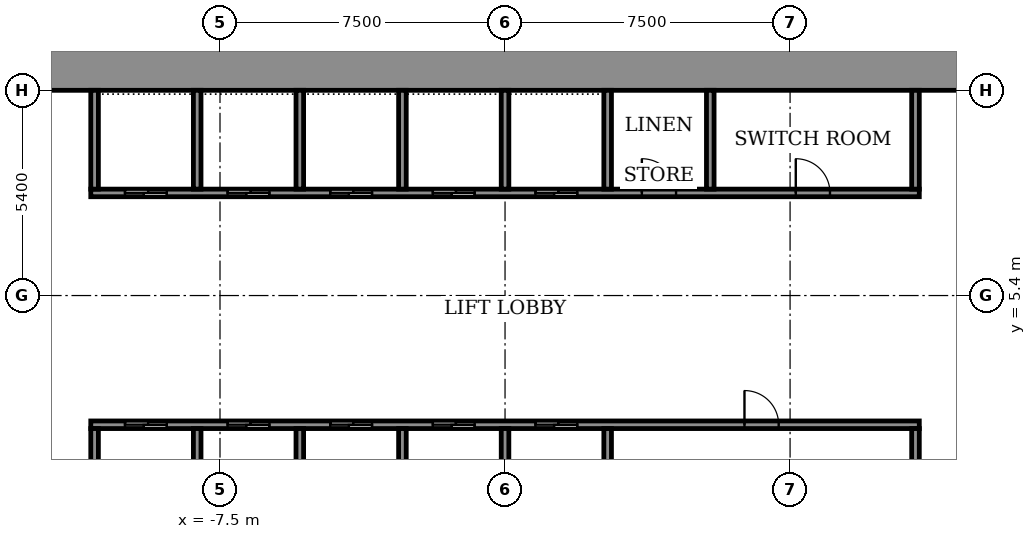
"""IFC4 building model, lengths in metres.
Left out: names, types, materials, properties, quantities, classifications, styles, units other than length and angle.
Written with IfcOpenShell. Run it as: python <this file> out.ifc"""

import sys

from ifc_helpers import new_model, si_unit, direction, frame, frame_2d, origin, place, context, subcontext, project, spatial, rectangle, extrude, element, fill, save


model = new_model("IFC4")
c1 = context("Model", 3, precision=1e-05, world=origin(), true_north=direction((0.0, 1.0)))
c2 = subcontext(c1, "Body", "Model", "MODEL_VIEW")
j1 = project(units=[si_unit("LENGTHUNIT", "METRE"), si_unit("PLANEANGLEUNIT", "RADIAN")], contexts=[c1])
p1 = place(None, origin())
s1 = spatial("IfcSite", under=j1, at=p1, CompositionType="ELEMENT")
p2 = place(p1, origin())
s2 = spatial("IfcBuilding", under=s1, at=p2, CompositionType="ELEMENT")
p3 = place(p2, frame((0.0, 0.0, 44.9)))
s3 = spatial("IfcBuildingStorey", under=s2, at=p3, CompositionType="ELEMENT", Elevation=44.9)
p4 = place(p3, frame((-14.9, 11.35, 0.0), z_axis=(0.0, 0.0, 1.0), x_axis=(1.0, 0.0, 0.0)))
e1 = element("IfcWall", 1, at=p4, inside=s3, PredefinedType="SHEAR", context=c2, shape_type="SweptSolid", body=[
    extrude(rectangle(XDim=29.8, YDim=1.1, at=frame_2d((14.9, 0.0))), origin(), (0.0, 0.0, 1.0), 3.6),
])
p5 = place(p3, frame((-10.9, 2.0, 0.0), z_axis=(0.0, 0.0, 1.0), x_axis=(1.0, 0.0, 0.0)))
e2 = element("IfcWall", 2, at=p5, inside=s3, PredefinedType="SHEAR", context=c2, shape_type="SweptSolid", body=[
    extrude(rectangle(XDim=21.8, YDim=0.2, at=frame_2d((10.9, 0.0))), origin(), (0.0, 0.0, 1.0), 3.05),
])
p6 = place(p5, frame((0.9, 0.0, 0.0)))
e3 = element("IfcOpeningElement", 3, at=p6, cuts=e2, PredefinedType="OPENING", context=c2, shape_type="SweptSolid", body=[
    extrude(rectangle(XDim=1.1, YDim=2.1, at=frame_2d((0.55, 1.05))), frame((0.0, 0.11, 0.0), z_axis=(0.0, -1.0, 0.0), x_axis=(1.0, 0.0, 0.0)), (0.0, 0.0, 1.0), 0.22),
])
p7 = place(p5, frame((3.6, 0.0, 0.0)))
e4 = element("IfcOpeningElement", 4, at=p7, cuts=e2, PredefinedType="OPENING", context=c2, shape_type="SweptSolid", body=[
    extrude(rectangle(XDim=1.1, YDim=2.1, at=frame_2d((0.55, 1.05))), frame((0.0, 0.11, 0.0), z_axis=(0.0, -1.0, 0.0), x_axis=(1.0, 0.0, 0.0)), (0.0, 0.0, 1.0), 0.22),
])
p8 = place(p5, frame((6.3, 0.0, 0.0)))
e5 = element("IfcOpeningElement", 5, at=p8, cuts=e2, PredefinedType="OPENING", context=c2, shape_type="SweptSolid", body=[
    extrude(rectangle(XDim=1.1, YDim=2.1, at=frame_2d((0.55, 1.05))), frame((0.0, 0.11, 0.0), z_axis=(0.0, -1.0, 0.0), x_axis=(1.0, 0.0, 0.0)), (0.0, 0.0, 1.0), 0.22),
])
p9 = place(p5, frame((9.0, 0.0, 0.0)))
e6 = element("IfcOpeningElement", 6, at=p9, cuts=e2, PredefinedType="OPENING", context=c2, shape_type="SweptSolid", body=[
    extrude(rectangle(XDim=1.1, YDim=2.1, at=frame_2d((0.55, 1.05))), frame((0.0, 0.11, 0.0), z_axis=(0.0, -1.0, 0.0), x_axis=(1.0, 0.0, 0.0)), (0.0, 0.0, 1.0), 0.22),
])
p10 = place(p5, frame((11.7, 0.0, 0.0)))
e7 = element("IfcOpeningElement", 7, at=p10, cuts=e2, PredefinedType="OPENING", context=c2, shape_type="SweptSolid", body=[
    extrude(rectangle(XDim=1.1, YDim=2.1, at=frame_2d((0.55, 1.05))), frame((0.0, 0.11, 0.0), z_axis=(0.0, -1.0, 0.0), x_axis=(1.0, 0.0, 0.0)), (0.0, 0.0, 1.0), 0.22),
])
p11 = place(p5, frame((17.2, 0.0, 0.0)))
e8 = element("IfcOpeningElement", 8, at=p11, cuts=e2, PredefinedType="OPENING", context=c2, shape_type="SweptSolid", body=[
    extrude(rectangle(XDim=0.9, YDim=2.1, at=frame_2d((0.45, 1.05))), frame((0.0, 0.11, 0.0), z_axis=(0.0, -1.0, 0.0), x_axis=(1.0, 0.0, 0.0)), (0.0, 0.0, 1.0), 0.22),
])
p12 = place(p3, frame((-10.9, 8.1, 0.0), z_axis=(0.0, 0.0, 1.0), x_axis=(1.0, 0.0, 0.0)))
e9 = element("IfcWall", 9, at=p12, inside=s3, PredefinedType="SHEAR", context=c2, shape_type="SweptSolid", body=[
    extrude(rectangle(XDim=21.8, YDim=0.2, at=frame_2d((10.9, 0.0))), origin(), (0.0, 0.0, 1.0), 3.05),
])
p13 = place(p12, frame((0.9, 0.0, 0.0)))
e10 = element("IfcOpeningElement", 10, at=p13, cuts=e9, PredefinedType="OPENING", context=c2, shape_type="SweptSolid", body=[
    extrude(rectangle(XDim=1.1, YDim=2.1, at=frame_2d((0.55, 1.05))), frame((0.0, 0.11, 0.0), z_axis=(0.0, -1.0, 0.0), x_axis=(1.0, 0.0, 0.0)), (0.0, 0.0, 1.0), 0.22),
])
p14 = place(p12, frame((3.6, 0.0, 0.0)))
e11 = element("IfcOpeningElement", 11, at=p14, cuts=e9, PredefinedType="OPENING", context=c2, shape_type="SweptSolid", body=[
    extrude(rectangle(XDim=1.1, YDim=2.1, at=frame_2d((0.55, 1.05))), frame((0.0, 0.11, 0.0), z_axis=(0.0, -1.0, 0.0), x_axis=(1.0, 0.0, 0.0)), (0.0, 0.0, 1.0), 0.22),
])
p15 = place(p12, frame((6.3, 0.0, 0.0)))
e12 = element("IfcOpeningElement", 12, at=p15, cuts=e9, PredefinedType="OPENING", context=c2, shape_type="SweptSolid", body=[
    extrude(rectangle(XDim=1.1, YDim=2.1, at=frame_2d((0.55, 1.05))), frame((0.0, 0.11, 0.0), z_axis=(0.0, -1.0, 0.0), x_axis=(1.0, 0.0, 0.0)), (0.0, 0.0, 1.0), 0.22),
])
p16 = place(p12, frame((9.0, 0.0, 0.0)))
e13 = element("IfcOpeningElement", 13, at=p16, cuts=e9, PredefinedType="OPENING", context=c2, shape_type="SweptSolid", body=[
    extrude(rectangle(XDim=1.1, YDim=2.1, at=frame_2d((0.55, 1.05))), frame((0.0, 0.11, 0.0), z_axis=(0.0, -1.0, 0.0), x_axis=(1.0, 0.0, 0.0)), (0.0, 0.0, 1.0), 0.22),
])
p17 = place(p12, frame((11.7, 0.0, 0.0)))
e14 = element("IfcOpeningElement", 14, at=p17, cuts=e9, PredefinedType="OPENING", context=c2, shape_type="SweptSolid", body=[
    extrude(rectangle(XDim=1.1, YDim=2.1, at=frame_2d((0.55, 1.05))), frame((0.0, 0.11, 0.0), z_axis=(0.0, -1.0, 0.0), x_axis=(1.0, 0.0, 0.0)), (0.0, 0.0, 1.0), 0.22),
])
p18 = place(p12, frame((14.5, 0.0, 0.0)))
e15 = element("IfcOpeningElement", 15, at=p18, cuts=e9, PredefinedType="OPENING", context=c2, shape_type="SweptSolid", body=[
    extrude(rectangle(XDim=0.9, YDim=2.1, at=frame_2d((0.45, 1.05))), frame((0.0, 0.11, 0.0), z_axis=(0.0, -1.0, 0.0), x_axis=(1.0, 0.0, 0.0)), (0.0, 0.0, 1.0), 0.22),
])
p19 = place(p12, frame((18.55, 0.0, 0.0)))
e16 = element("IfcOpeningElement", 16, at=p19, cuts=e9, PredefinedType="OPENING", context=c2, shape_type="SweptSolid", body=[
    extrude(rectangle(XDim=0.9, YDim=2.1, at=frame_2d((0.45, 1.05))), frame((0.0, 0.11, 0.0), z_axis=(0.0, -1.0, 0.0), x_axis=(1.0, 0.0, 0.0)), (0.0, 0.0, 1.0), 0.22),
])
for number, where, z_axis, x_axis in (
    (17, (-10.8, -0.6, 0.0), (0.0, 0.0, 1.0), (0.0, 1.0, 0.0)),
    (18, (-8.1, -0.6, 0.0), (0.0, 0.0, 1.0), (0.0, 1.0, 0.0)),
    (19, (-5.4, -0.6, 0.0), (0.0, 0.0, 1.0), (0.0, 1.0, 0.0)),
    (20, (-2.7, -0.6, 0.0), (0.0, 0.0, 1.0), (0.0, 1.0, 0.0)),
    (21, (0.0, -0.6, 0.0), (0.0, 0.0, 1.0), (0.0, 1.0, 0.0)),
    (22, (2.7, -0.6, 0.0), (0.0, 0.0, 1.0), (0.0, 1.0, 0.0)),
):
    element("IfcWall", number, at=place(p3, frame(where, z_axis=z_axis, x_axis=x_axis)), inside=s3, PredefinedType="SHEAR", context=c2, shape_type="SweptSolid", body=[
        extrude(rectangle(XDim=2.5, YDim=0.2, at=frame_2d((1.25, 0.0))), origin(), (0.0, 0.0, 1.0), 3.05),
    ])
p20 = place(p3, frame((10.8, -0.6, 0.0), z_axis=(0.0, 0.0, 1.0), x_axis=(0.0, 1.0, 0.0)))
e23 = element("IfcWall", 23, at=p20, inside=s3, PredefinedType="STANDARD", context=c2, shape_type="SweptSolid", body=[
    extrude(rectangle(XDim=2.5, YDim=0.2, at=frame_2d((1.25, 0.0))), origin(), (0.0, 0.0, 1.0), 3.05),
])
for number, where, z_axis, x_axis in (
    (24, (-10.8, 8.2, 0.0), (0.0, 0.0, 1.0), (0.0, 1.0, 0.0)),
    (25, (-8.1, 8.2, 0.0), (0.0, 0.0, 1.0), (0.0, 1.0, 0.0)),
    (26, (-5.4, 8.2, 0.0), (0.0, 0.0, 1.0), (0.0, 1.0, 0.0)),
    (27, (-2.7, 8.2, 0.0), (0.0, 0.0, 1.0), (0.0, 1.0, 0.0)),
    (28, (0.0, 8.2, 0.0), (0.0, 0.0, 1.0), (0.0, 1.0, 0.0)),
    (29, (2.7, 8.2, 0.0), (0.0, 0.0, 1.0), (0.0, 1.0, 0.0)),
):
    element("IfcWall", number, at=place(p3, frame(where, z_axis=z_axis, x_axis=x_axis)), inside=s3, PredefinedType="SHEAR", context=c2, shape_type="SweptSolid", body=[
        extrude(rectangle(XDim=2.6, YDim=0.2, at=frame_2d((1.3, 0.0))), origin(), (0.0, 0.0, 1.0), 3.05),
    ])
for number, where, z_axis, x_axis in (
    (30, (5.4, 8.2, 0.0), (0.0, 0.0, 1.0), (0.0, 1.0, 0.0)),
    (31, (10.8, 8.2, 0.0), (0.0, 0.0, 1.0), (0.0, 1.0, 0.0)),
):
    element("IfcWall", number, at=place(p3, frame(where, z_axis=z_axis, x_axis=x_axis)), inside=s3, PredefinedType="STANDARD", context=c2, shape_type="SweptSolid", body=[
        extrude(rectangle(XDim=2.6, YDim=0.2, at=frame_2d((1.3, 0.0))), origin(), (0.0, 0.0, 1.0), 3.05),
    ])
p21 = place(p6, origin())
e32 = element("IfcDoor", 32, at=p21, inside=s3, OperationType="SLIDING_TO_LEFT", PredefinedType="DOOR", context=c2, shape_type="SweptSolid", body=[
    extrude(rectangle(XDim=1.1, YDim=2.1, at=frame_2d((0.55, 1.05))), frame((0.0, 0.025, 0.0), z_axis=(0.0, -1.0, 0.0), x_axis=(1.0, 0.0, 0.0)), (0.0, 0.0, 1.0), 0.05),
])
fill(e3, e32)
p22 = place(p7, origin())
e33 = element("IfcDoor", 33, at=p22, inside=s3, OperationType="SLIDING_TO_LEFT", PredefinedType="DOOR", context=c2, shape_type="SweptSolid", body=[
    extrude(rectangle(XDim=1.1, YDim=2.1, at=frame_2d((0.55, 1.05))), frame((0.0, 0.025, 0.0), z_axis=(0.0, -1.0, 0.0), x_axis=(1.0, 0.0, 0.0)), (0.0, 0.0, 1.0), 0.05),
])
fill(e4, e33)
p23 = place(p8, origin())
e34 = element("IfcDoor", 34, at=p23, inside=s3, OperationType="SLIDING_TO_LEFT", PredefinedType="DOOR", context=c2, shape_type="SweptSolid", body=[
    extrude(rectangle(XDim=1.1, YDim=2.1, at=frame_2d((0.55, 1.05))), frame((0.0, 0.025, 0.0), z_axis=(0.0, -1.0, 0.0), x_axis=(1.0, 0.0, 0.0)), (0.0, 0.0, 1.0), 0.05),
])
fill(e5, e34)
p24 = place(p9, origin())
e35 = element("IfcDoor", 35, at=p24, inside=s3, OperationType="SLIDING_TO_LEFT", PredefinedType="DOOR", context=c2, shape_type="SweptSolid", body=[
    extrude(rectangle(XDim=1.1, YDim=2.1, at=frame_2d((0.55, 1.05))), frame((0.0, 0.025, 0.0), z_axis=(0.0, -1.0, 0.0), x_axis=(1.0, 0.0, 0.0)), (0.0, 0.0, 1.0), 0.05),
])
fill(e6, e35)
p25 = place(p10, origin())
e36 = element("IfcDoor", 36, at=p25, inside=s3, OperationType="SLIDING_TO_LEFT", PredefinedType="DOOR", context=c2, shape_type="SweptSolid", body=[
    extrude(rectangle(XDim=1.1, YDim=2.1, at=frame_2d((0.55, 1.05))), frame((0.0, 0.025, 0.0), z_axis=(0.0, -1.0, 0.0), x_axis=(1.0, 0.0, 0.0)), (0.0, 0.0, 1.0), 0.05),
])
fill(e7, e36)
p26 = place(p13, origin())
e37 = element("IfcDoor", 37, at=p26, inside=s3, OperationType="SLIDING_TO_LEFT", PredefinedType="DOOR", context=c2, shape_type="SweptSolid", body=[
    extrude(rectangle(XDim=1.1, YDim=2.1, at=frame_2d((0.55, 1.05))), frame((0.0, 0.025, 0.0), z_axis=(0.0, -1.0, 0.0), x_axis=(1.0, 0.0, 0.0)), (0.0, 0.0, 1.0), 0.05),
])
fill(e10, e37)
p27 = place(p14, origin())
e38 = element("IfcDoor", 38, at=p27, inside=s3, OperationType="SLIDING_TO_LEFT", PredefinedType="DOOR", context=c2, shape_type="SweptSolid", body=[
    extrude(rectangle(XDim=1.1, YDim=2.1, at=frame_2d((0.55, 1.05))), frame((0.0, 0.025, 0.0), z_axis=(0.0, -1.0, 0.0), x_axis=(1.0, 0.0, 0.0)), (0.0, 0.0, 1.0), 0.05),
])
fill(e11, e38)
p28 = place(p15, origin())
e39 = element("IfcDoor", 39, at=p28, inside=s3, OperationType="SLIDING_TO_LEFT", PredefinedType="DOOR", context=c2, shape_type="SweptSolid", body=[
    extrude(rectangle(XDim=1.1, YDim=2.1, at=frame_2d((0.55, 1.05))), frame((0.0, 0.025, 0.0), z_axis=(0.0, -1.0, 0.0), x_axis=(1.0, 0.0, 0.0)), (0.0, 0.0, 1.0), 0.05),
])
fill(e12, e39)
p29 = place(p16, origin())
e40 = element("IfcDoor", 40, at=p29, inside=s3, OperationType="SLIDING_TO_LEFT", PredefinedType="DOOR", context=c2, shape_type="SweptSolid", body=[
    extrude(rectangle(XDim=1.1, YDim=2.1, at=frame_2d((0.55, 1.05))), frame((0.0, 0.025, 0.0), z_axis=(0.0, -1.0, 0.0), x_axis=(1.0, 0.0, 0.0)), (0.0, 0.0, 1.0), 0.05),
])
fill(e13, e40)
p30 = place(p17, origin())
e41 = element("IfcDoor", 41, at=p30, inside=s3, OperationType="SLIDING_TO_LEFT", PredefinedType="DOOR", context=c2, shape_type="SweptSolid", body=[
    extrude(rectangle(XDim=1.1, YDim=2.1, at=frame_2d((0.55, 1.05))), frame((0.0, 0.025, 0.0), z_axis=(0.0, -1.0, 0.0), x_axis=(1.0, 0.0, 0.0)), (0.0, 0.0, 1.0), 0.05),
])
fill(e14, e41)
p31 = place(p11, origin())
e42 = element("IfcDoor", 42, at=p31, inside=s3, OperationType="SINGLE_SWING_LEFT", PredefinedType="DOOR", context=c2, shape_type="SweptSolid", body=[
    extrude(rectangle(XDim=0.9, YDim=2.1, at=frame_2d((0.45, 1.05))), frame((0.0, 0.025, 0.0), z_axis=(0.0, -1.0, 0.0), x_axis=(1.0, 0.0, 0.0)), (0.0, 0.0, 1.0), 0.05),
])
fill(e8, e42)
p32 = place(p18, origin())
e43 = element("IfcDoor", 43, at=p32, inside=s3, OperationType="SINGLE_SWING_RIGHT", PredefinedType="DOOR", context=c2, shape_type="SweptSolid", body=[
    extrude(rectangle(XDim=0.9, YDim=2.1, at=frame_2d((0.45, 1.05))), frame((0.0, 0.025, 0.0), z_axis=(0.0, -1.0, 0.0), x_axis=(1.0, 0.0, 0.0)), (0.0, 0.0, 1.0), 0.05),
])
fill(e15, e43)
p33 = place(p19, origin())
e44 = element("IfcDoor", 44, at=p33, inside=s3, OperationType="SINGLE_SWING_LEFT", PredefinedType="DOOR", context=c2, shape_type="SweptSolid", body=[
    extrude(rectangle(XDim=0.9, YDim=2.1, at=frame_2d((0.45, 1.05))), frame((0.0, 0.025, 0.0), z_axis=(0.0, -1.0, 0.0), x_axis=(1.0, 0.0, 0.0)), (0.0, 0.0, 1.0), 0.05),
])
fill(e16, e44)
save(model, sys.argv[1])
